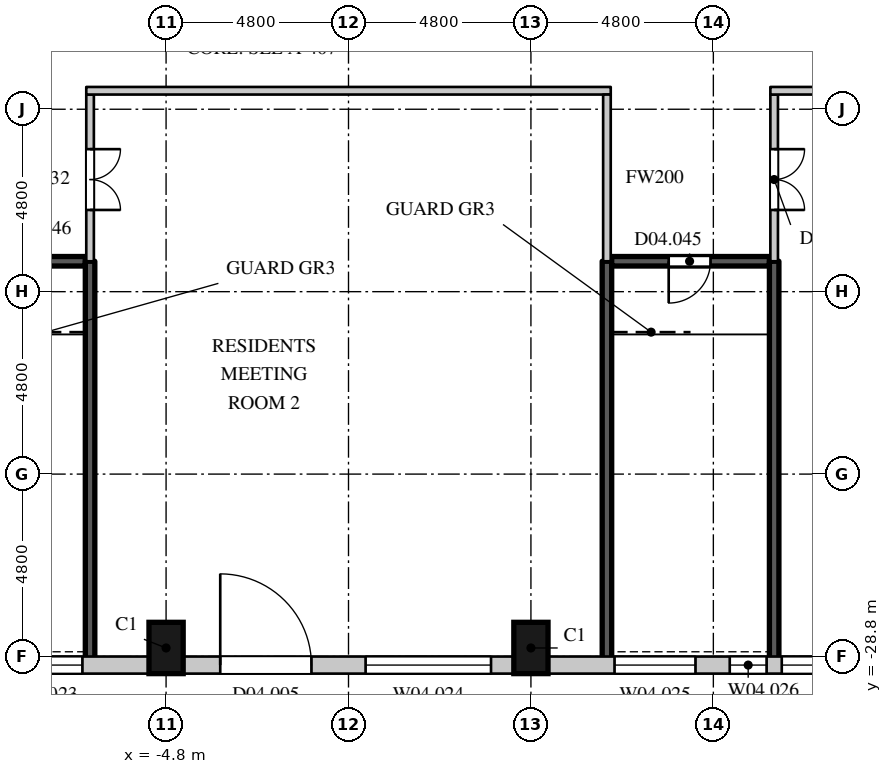
"""IFC4 building model, lengths in metres.
Left out: names, types, materials, properties, quantities, classifications, styles, units other than length and angle.
Written with IfcOpenShell. Run it as: python <this file> out.ifc"""

import sys

from ifc_helpers import new_model, si_unit, direction, frame, frame_2d, origin, origin_2d, place, context, subcontext, project, spatial, rectangle, extrude, element, fill, save


model = new_model("IFC4")
c1 = context("Model", 3, precision=1e-05, world=origin(), true_north=direction((0.0, 1.0)))
c2 = subcontext(c1, "Body", "Model", "MODEL_VIEW")
j1 = project(units=[si_unit("LENGTHUNIT", "METRE"), si_unit("PLANEANGLEUNIT", "RADIAN")], contexts=[c1])
p1 = place(None, origin())
s1 = spatial("IfcSite", under=j1, at=p1, CompositionType="ELEMENT")
p2 = place(p1, origin())
s2 = spatial("IfcBuilding", under=s1, at=p2, CompositionType="ELEMENT")
p3 = place(p2, frame((0.0, 0.0, 21.0)))
s3 = spatial("IfcBuildingStorey", under=s2, at=p3, CompositionType="ELEMENT", Elevation=21.0)
for number, where, z_axis, x_axis in (
    (1, (-4.8, -28.575, 0.0), (0.0, 0.0, 1.0), (1.0, 0.0, 0.0)),
    (2, (4.8, -28.575, 0.0), (0.0, 0.0, 1.0), (1.0, 0.0, 0.0)),
):
    element("IfcColumn", number, at=place(p3, frame(where, z_axis=z_axis, x_axis=x_axis)), inside=s3, PredefinedType="COLUMN", context=c2, shape_type="SweptSolid", body=[
        extrude(rectangle(XDim=0.9, YDim=1.35, at=origin_2d()), origin(), (0.0, 0.0, 1.0), 4.5),
    ])
p4 = place(p3, frame((-13.913, -29.025, 0.9), z_axis=(0.0, 0.0, 1.0), x_axis=(1.0, 0.0, 0.0)))
e3 = element("IfcWall", 3, at=p4, inside=s3, PredefinedType="ELEMENTEDWALL", context=c2, shape_type="SweptSolid", body=[
    extrude(rectangle(XDim=8.663, YDim=0.45, at=frame_2d((4.332, 0.0))), origin(), (0.0, 0.0, 1.0), 3.3),
])
p5 = place(p4, frame((0.582, 0.0, 0.15)))
e4 = element("IfcOpeningElement", 4, at=p5, cuts=e3, PredefinedType="OPENING", context=c2, shape_type="SweptSolid", body=[
    extrude(rectangle(XDim=1.93, YDim=2.7, at=frame_2d((0.965, 1.35))), frame((0.0, 0.235, 0.0), z_axis=(0.0, -1.0, 0.0), x_axis=(1.0, 0.0, 0.0)), (0.0, 0.0, 1.0), 0.47),
])
p6 = place(p4, frame((2.913, 0.0, 0.15)))
e5 = element("IfcOpeningElement", 5, at=p6, cuts=e3, PredefinedType="OPENING", context=c2, shape_type="SweptSolid", body=[
    extrude(rectangle(XDim=0.97, YDim=2.7, at=frame_2d((0.485, 1.35))), frame((0.0, 0.235, 0.0), z_axis=(0.0, -1.0, 0.0), x_axis=(1.0, 0.0, 0.0)), (0.0, 0.0, 1.0), 0.47),
])
p7 = place(p4, frame((4.781, 0.0, 0.15)))
e6 = element("IfcOpeningElement", 6, at=p7, cuts=e3, PredefinedType="OPENING", context=c2, shape_type="SweptSolid", body=[
    extrude(rectangle(XDim=2.13, YDim=2.7, at=frame_2d((1.065, 1.35))), frame((0.0, 0.235, 0.0), z_axis=(0.0, -1.0, 0.0), x_axis=(1.0, 0.0, 0.0)), (0.0, 0.0, 1.0), 0.47),
])
p8 = place(p3, frame((-4.35, -29.025, 0.0), z_axis=(0.0, 0.0, 1.0), x_axis=(1.0, 0.0, 0.0)))
e7 = element("IfcWall", 7, at=p8, inside=s3, PredefinedType="ELEMENTEDWALL", context=c2, shape_type="SweptSolid", body=[
    extrude(rectangle(XDim=8.7, YDim=0.45, at=frame_2d((4.35, 0.0))), origin(), (0.0, 0.0, 1.0), 4.2),
])
p9 = place(p8, frame((0.975, 0.0, 0.0)))
e8 = element("IfcOpeningElement", 8, at=p9, cuts=e7, PredefinedType="OPENING", context=c2, shape_type="SweptSolid", body=[
    extrude(rectangle(XDim=2.4, YDim=2.7, at=frame_2d((1.2, 1.35))), frame((0.0, 0.235, 0.0), z_axis=(0.0, -1.0, 0.0), x_axis=(1.0, 0.0, 0.0)), (0.0, 0.0, 1.0), 0.47),
])
p10 = place(p8, frame((4.8, 0.0, 1.05)))
e9 = element("IfcOpeningElement", 9, at=p10, cuts=e7, PredefinedType="OPENING", context=c2, shape_type="SweptSolid", body=[
    extrude(rectangle(XDim=3.3, YDim=2.7, at=frame_2d((1.65, 1.35))), frame((0.0, 0.235, 0.0), z_axis=(0.0, -1.0, 0.0), x_axis=(1.0, 0.0, 0.0)), (0.0, 0.0, 1.0), 0.47),
])
p11 = place(p3, frame((5.25, -29.025, 0.9), z_axis=(0.0, 0.0, 1.0), x_axis=(1.0, 0.0, 0.0)))
e10 = element("IfcWall", 10, at=p11, inside=s3, PredefinedType="ELEMENTEDWALL", context=c2, shape_type="SweptSolid", body=[
    extrude(rectangle(XDim=8.663, YDim=0.45, at=frame_2d((4.332, 0.0))), origin(), (0.0, 0.0, 1.0), 3.3),
])
p12 = place(p11, frame((1.75, 0.0, 0.15)))
e11 = element("IfcOpeningElement", 11, at=p12, cuts=e10, PredefinedType="OPENING", context=c2, shape_type="SweptSolid", body=[
    extrude(rectangle(XDim=2.13, YDim=2.7, at=frame_2d((1.065, 1.35))), frame((0.0, 0.235, 0.0), z_axis=(0.0, -1.0, 0.0), x_axis=(1.0, 0.0, 0.0)), (0.0, 0.0, 1.0), 0.47),
])
p13 = place(p11, frame((4.781, 0.0, 0.15)))
e12 = element("IfcOpeningElement", 12, at=p13, cuts=e10, PredefinedType="OPENING", context=c2, shape_type="SweptSolid", body=[
    extrude(rectangle(XDim=0.97, YDim=2.7, at=frame_2d((0.485, 1.35))), frame((0.0, 0.235, 0.0), z_axis=(0.0, -1.0, 0.0), x_axis=(1.0, 0.0, 0.0)), (0.0, 0.0, 1.0), 0.47),
])
p14 = place(p11, frame((6.15, 0.0, 0.15)))
e13 = element("IfcOpeningElement", 13, at=p14, cuts=e10, PredefinedType="OPENING", context=c2, shape_type="SweptSolid", body=[
    extrude(rectangle(XDim=1.93, YDim=2.7, at=frame_2d((0.965, 1.35))), frame((0.0, 0.235, 0.0), z_axis=(0.0, -1.0, 0.0), x_axis=(1.0, 0.0, 0.0)), (0.0, 0.0, 1.0), 0.47),
])
p15 = place(p3, frame((-6.8, -18.4, 0.0), z_axis=(0.0, 0.0, 1.0), x_axis=(0.0, 1.0, 0.0)))
e14 = element("IfcWall", 14, at=p15, inside=s3, PredefinedType="PARTITIONING", context=c2, shape_type="SweptSolid", body=[
    extrude(rectangle(XDim=4.386, YDim=0.2, at=frame_2d((2.193, 0.0))), origin(), (0.0, 0.0, 1.0), 4.25),
])
p16 = place(p15, frame((1.35, 0.0, 0.0)))
e15 = element("IfcOpeningElement", 15, at=p16, cuts=e14, PredefinedType="OPENING", context=c2, shape_type="SweptSolid", body=[
    extrude(rectangle(XDim=1.6, YDim=2.4, at=frame_2d((0.8, 1.2))), frame((0.0, 0.11, 0.0), z_axis=(0.0, -1.0, 0.0), x_axis=(1.0, 0.0, 0.0)), (0.0, 0.0, 1.0), 0.22),
])
p17 = place(p3, frame((-6.9, -13.914, 0.0), z_axis=(0.0, 0.0, 1.0), x_axis=(1.0, 0.0, 0.0)))
e16 = element("IfcWall", 16, at=p17, inside=s3, PredefinedType="PARTITIONING", context=c2, shape_type="SweptSolid", body=[
    extrude(rectangle(XDim=13.8, YDim=0.2, at=frame_2d((6.9, 0.0))), origin(), (0.0, 0.0, 1.0), 4.25),
])
p18 = place(p3, frame((6.8, -18.4, 0.0), z_axis=(0.0, 0.0, 1.0), x_axis=(0.0, 1.0, 0.0)))
e17 = element("IfcWall", 17, at=p18, inside=s3, PredefinedType="PARTITIONING", context=c2, shape_type="SweptSolid", body=[
    extrude(rectangle(XDim=4.386, YDim=0.2, at=frame_2d((2.193, 0.0))), origin(), (0.0, 0.0, 1.0), 4.25),
])
p19 = place(p3, frame((11.2, -18.4, 0.0), z_axis=(0.0, 0.0, 1.0), x_axis=(0.0, 1.0, 0.0)))
e18 = element("IfcWall", 18, at=p19, inside=s3, PredefinedType="PARTITIONING", context=c2, shape_type="SweptSolid", body=[
    extrude(rectangle(XDim=4.386, YDim=0.2, at=frame_2d((2.193, 0.0))), origin(), (0.0, 0.0, 1.0), 4.25),
])
p20 = place(p19, frame((1.35, 0.0, 0.0)))
e19 = element("IfcOpeningElement", 19, at=p20, cuts=e18, PredefinedType="OPENING", context=c2, shape_type="SweptSolid", body=[
    extrude(rectangle(XDim=1.6, YDim=2.4, at=frame_2d((0.8, 1.2))), frame((0.0, 0.11, 0.0), z_axis=(0.0, -1.0, 0.0), x_axis=(1.0, 0.0, 0.0)), (0.0, 0.0, 1.0), 0.22),
])
p21 = place(p3, frame((11.1, -13.914, 0.0), z_axis=(0.0, 0.0, 1.0), x_axis=(1.0, 0.0, 0.0)))
e20 = element("IfcWall", 20, at=p21, inside=s3, PredefinedType="PARTITIONING", context=c2, shape_type="SweptSolid", body=[
    extrude(rectangle(XDim=5.6, YDim=0.2, at=frame_2d((2.8, 0.0))), origin(), (0.0, 0.0, 1.0), 4.25),
])
p22 = place(p3, frame((-11.075, -18.4, 0.0), z_axis=(0.0, 0.0, 1.0), x_axis=(1.0, 0.0, 0.0)))
e21 = element("IfcWall", 21, at=p22, inside=s3, PredefinedType="SHEAR", context=c2, shape_type="SweptSolid", body=[
    extrude(rectangle(XDim=4.15, YDim=0.25, at=frame_2d((2.075, 0.0))), origin(), (0.0, 0.0, 1.0), 4.25),
])
p23 = place(p22, frame((1.5, 0.0, 0.0)))
e22 = element("IfcOpeningElement", 22, at=p23, cuts=e21, PredefinedType="OPENING", context=c2, shape_type="SweptSolid", body=[
    extrude(rectangle(XDim=1.1, YDim=2.2, at=frame_2d((0.55, 1.1))), frame((0.0, 0.135, 0.0), z_axis=(0.0, -1.0, 0.0), x_axis=(1.0, 0.0, 0.0)), (0.0, 0.0, 1.0), 0.27),
])
for number, where, z_axis, x_axis in (
    (23, (-6.8, -28.855, 0.0), (0.0, 0.0, 1.0), (0.0, 1.0, 0.0)),
    (24, (6.8, -28.855, 0.0), (0.0, 0.0, 1.0), (0.0, 1.0, 0.0)),
):
    element("IfcWall", number, at=place(p3, frame(where, z_axis=z_axis, x_axis=x_axis)), inside=s3, PredefinedType="SHEAR", context=c2, shape_type="SweptSolid", body=[
        extrude(rectangle(XDim=10.455, YDim=0.25, at=frame_2d((5.228, 0.0))), origin(), (0.0, 0.0, 1.0), 4.25),
    ])
p24 = place(p3, frame((6.925, -18.4, 0.0), z_axis=(0.0, 0.0, 1.0), x_axis=(1.0, 0.0, 0.0)))
e25 = element("IfcWall", 25, at=p24, inside=s3, PredefinedType="SHEAR", context=c2, shape_type="SweptSolid", body=[
    extrude(rectangle(XDim=4.15, YDim=0.25, at=frame_2d((2.075, 0.0))), origin(), (0.0, 0.0, 1.0), 4.25),
])
p25 = place(p24, frame((1.5, 0.0, 0.0)))
e26 = element("IfcOpeningElement", 26, at=p25, cuts=e25, PredefinedType="OPENING", context=c2, shape_type="SweptSolid", body=[
    extrude(rectangle(XDim=1.1, YDim=2.2, at=frame_2d((0.55, 1.1))), frame((0.0, 0.135, 0.0), z_axis=(0.0, -1.0, 0.0), x_axis=(1.0, 0.0, 0.0)), (0.0, 0.0, 1.0), 0.27),
])
p26 = place(p3, frame((11.2, -28.855, 0.0), z_axis=(0.0, 0.0, 1.0), x_axis=(0.0, 1.0, 0.0)))
e27 = element("IfcWall", 27, at=p26, inside=s3, PredefinedType="SHEAR", context=c2, shape_type="SweptSolid", body=[
    extrude(rectangle(XDim=10.455, YDim=0.25, at=frame_2d((5.228, 0.0))), origin(), (0.0, 0.0, 1.0), 4.25),
])
p27 = place(p7, origin())
e28 = element("IfcWindow", 28, at=p27, inside=s3, PartitioningType="SINGLE_PANEL", PredefinedType="WINDOW", context=c2, shape_type="SweptSolid", body=[
    extrude(rectangle(XDim=2.13, YDim=2.7, at=frame_2d((1.065, 1.35))), frame((0.0, 0.135, 0.0), z_axis=(0.0, -1.0, 0.0), x_axis=(1.0, 0.0, 0.0)), (0.0, 0.0, 1.0), 0.06),
])
fill(e6, e28)
p28 = place(p9, origin())
e29 = element("IfcDoor", 29, at=p28, inside=s3, OperationType="SINGLE_SWING_LEFT", PredefinedType="DOOR", context=c2, shape_type="SweptSolid", body=[
    extrude(rectangle(XDim=2.4, YDim=2.7, at=frame_2d((1.2, 1.35))), frame((0.0, 0.13, 0.0), z_axis=(0.0, -1.0, 0.0), x_axis=(1.0, 0.0, 0.0)), (0.0, 0.0, 1.0), 0.05),
])
fill(e8, e29)
p29 = place(p10, origin())
e30 = element("IfcWindow", 30, at=p29, inside=s3, PartitioningType="SINGLE_PANEL", PredefinedType="WINDOW", context=c2, shape_type="SweptSolid", body=[
    extrude(rectangle(XDim=3.3, YDim=2.7, at=frame_2d((1.65, 1.35))), frame((0.0, 0.135, 0.0), z_axis=(0.0, -1.0, 0.0), x_axis=(1.0, 0.0, 0.0)), (0.0, 0.0, 1.0), 0.06),
])
fill(e9, e30)
p30 = place(p12, origin())
e31 = element("IfcWindow", 31, at=p30, inside=s3, PartitioningType="SINGLE_PANEL", PredefinedType="WINDOW", context=c2, shape_type="SweptSolid", body=[
    extrude(rectangle(XDim=2.13, YDim=2.7, at=frame_2d((1.065, 1.35))), frame((0.0, 0.135, 0.0), z_axis=(0.0, -1.0, 0.0), x_axis=(1.0, 0.0, 0.0)), (0.0, 0.0, 1.0), 0.06),
])
fill(e11, e31)
p31 = place(p13, origin())
e32 = element("IfcWindow", 32, at=p31, inside=s3, PartitioningType="SINGLE_PANEL", PredefinedType="WINDOW", context=c2, shape_type="SweptSolid", body=[
    extrude(rectangle(XDim=0.97, YDim=2.7, at=frame_2d((0.485, 1.35))), frame((0.0, 0.135, 0.0), z_axis=(0.0, -1.0, 0.0), x_axis=(1.0, 0.0, 0.0)), (0.0, 0.0, 1.0), 0.06),
])
fill(e12, e32)
p32 = place(p14, origin())
e33 = element("IfcWindow", 33, at=p32, inside=s3, PartitioningType="SINGLE_PANEL", PredefinedType="WINDOW", context=c2, shape_type="SweptSolid", body=[
    extrude(rectangle(XDim=1.93, YDim=2.7, at=frame_2d((0.965, 1.35))), frame((0.0, 0.135, 0.0), z_axis=(0.0, -1.0, 0.0), x_axis=(1.0, 0.0, 0.0)), (0.0, 0.0, 1.0), 0.06),
])
fill(e13, e33)
p33 = place(p20, origin())
e34 = element("IfcDoor", 34, at=p33, inside=s3, OperationType="DOUBLE_DOOR_SINGLE_SWING", PredefinedType="DOOR", context=c2, shape_type="SweptSolid", body=[
    extrude(rectangle(XDim=1.6, YDim=2.4, at=frame_2d((0.8, 1.2))), frame((0.0, 0.025, 0.0), z_axis=(0.0, -1.0, 0.0), x_axis=(1.0, 0.0, 0.0)), (0.0, 0.0, 1.0), 0.05),
])
fill(e19, e34)
p34 = place(p16, origin())
e35 = element("IfcDoor", 35, at=p34, inside=s3, OperationType="DOUBLE_DOOR_SINGLE_SWING", PredefinedType="DOOR", context=c2, shape_type="SweptSolid", body=[
    extrude(rectangle(XDim=1.6, YDim=2.4, at=frame_2d((0.8, 1.2))), frame((0.0, 0.025, 0.0), z_axis=(0.0, -1.0, 0.0), x_axis=(1.0, 0.0, 0.0)), (0.0, 0.0, 1.0), 0.05),
])
fill(e15, e35)
p35 = place(p25, origin())
e36 = element("IfcDoor", 36, at=p35, inside=s3, OperationType="SINGLE_SWING_RIGHT", PredefinedType="DOOR", context=c2, shape_type="SweptSolid", body=[
    extrude(rectangle(XDim=1.1, YDim=2.2, at=frame_2d((0.55, 1.1))), frame((0.0, 0.025, 0.0), z_axis=(0.0, -1.0, 0.0), x_axis=(1.0, 0.0, 0.0)), (0.0, 0.0, 1.0), 0.05),
])
fill(e26, e36)
save(model, sys.argv[1])
